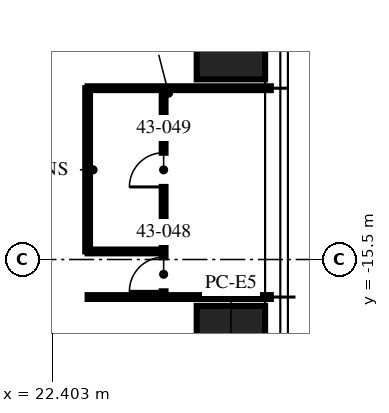
"""IFC4 building model, lengths in metres.
Left out: names, types, materials, properties, quantities, classifications, styles, units other than length and angle.
Written with IfcOpenShell. Run it as: python <this file> out.ifc"""

import sys

from ifc_helpers import new_model, si_unit, direction, frame, frame_2d, origin, origin_2d, place, context, subcontext, project, spatial, rectangle, hollow_rectangle, extrude, element, fill, save


model = new_model("IFC4")
c1 = context("Model", 3, precision=1e-05, world=origin(), true_north=direction((0.0, 1.0)))
c2 = subcontext(c1, "Body", "Model", "MODEL_VIEW")
j1 = project(units=[si_unit("LENGTHUNIT", "METRE"), si_unit("PLANEANGLEUNIT", "RADIAN")], contexts=[c1])
p1 = place(None, origin())
s1 = spatial("IfcSite", under=j1, at=p1, CompositionType="ELEMENT")
p2 = place(p1, origin())
s2 = spatial("IfcBuilding", under=s1, at=p2, CompositionType="ELEMENT")
p3 = place(p2, frame((0.0, 0.0, 171.0)))
s3 = spatial("IfcBuildingStorey", under=s2, at=p3, CompositionType="ELEMENT", Elevation=171.0)
for number, where, z_axis, x_axis in (
    (1, (27.1, -9.16, 0.0), (0.0, 0.0, 1.0), (0.0, 1.0, 0.0)),
    (2, (27.1, -18.32, 0.0), (0.0, 0.0, 1.0), (0.0, 1.0, 0.0)),
):
    element("IfcColumn", number, at=place(p3, frame(where, z_axis=z_axis, x_axis=x_axis)), inside=s3, PredefinedType="COLUMN", context=c2, shape_type="SweptSolid", body=[
        extrude(hollow_rectangle(XDim=3.2, YDim=1.8, WallThickness=0.2, at=origin_2d()), origin(), (0.0, 0.0, 1.0), 3.75),
    ])
for number, where, z_axis, x_axis in (
    (3, (23.33, -16.488, 0.0), (0.0, 0.0, 1.0), (1.0, 0.0, 0.0)),
    (4, (23.33, -10.992, 0.0), (0.0, 0.0, 1.0), (1.0, 0.0, 0.0)),
):
    element("IfcWall", number, at=place(p3, frame(where, z_axis=z_axis, x_axis=x_axis)), inside=s3, PredefinedType="PARTITIONING", context=c2, shape_type="SweptSolid", body=[
        extrude(rectangle(XDim=4.82, YDim=0.1, at=frame_2d((2.41, 0.0))), origin(), (0.0, 0.0, 1.0), 2.81),
    ])
p4 = place(p3, frame((25.33, -16.488, 0.0), z_axis=(0.0, 0.0, 1.0), x_axis=(0.0, 1.0, 0.0)))
e5 = element("IfcWall", 5, at=p4, inside=s3, PredefinedType="PARTITIONING", context=c2, shape_type="SweptSolid", body=[
    extrude(rectangle(XDim=5.496, YDim=0.1, at=frame_2d((2.748, 0.0))), origin(), (0.0, 0.0, 1.0), 2.81),
])
p5 = place(p4, frame((0.15, 0.0, 0.0)))
e6 = element("IfcOpeningElement", 6, at=p5, cuts=e5, PredefinedType="OPENING", context=c2, shape_type="SweptSolid", body=[
    extrude(rectangle(XDim=0.9, YDim=2.1, at=frame_2d((0.45, 1.05))), frame((0.0, 0.06, 0.0), z_axis=(0.0, -1.0, 0.0), x_axis=(1.0, 0.0, 0.0)), (0.0, 0.0, 1.0), 0.12),
])
p6 = place(p4, frame((2.898, 0.0, 0.0)))
e7 = element("IfcOpeningElement", 7, at=p6, cuts=e5, PredefinedType="OPENING", context=c2, shape_type="SweptSolid", body=[
    extrude(rectangle(XDim=0.9, YDim=2.1, at=frame_2d((0.45, 1.05))), frame((0.0, 0.06, 0.0), z_axis=(0.0, -1.0, 0.0), x_axis=(1.0, 0.0, 0.0)), (0.0, 0.0, 1.0), 0.12),
])
p7 = place(p3, frame((23.33, -15.288, 0.0), z_axis=(0.0, 0.0, 1.0), x_axis=(1.0, 0.0, 0.0)))
e8 = element("IfcWall", 8, at=p7, inside=s3, PredefinedType="PARTITIONING", context=c2, shape_type="SweptSolid", body=[
    extrude(rectangle(XDim=2.0, YDim=0.1, at=frame_2d((1.0, 0.0))), origin(), (0.0, 0.0, 1.0), 3.5),
])
p8 = place(p3, frame((23.33, -15.288, 0.0), z_axis=(0.0, 0.0, 1.0), x_axis=(0.0, 1.0, 0.0)))
e9 = element("IfcWall", 9, at=p8, inside=s3, PredefinedType="PARTITIONING", context=c2, shape_type="SweptSolid", body=[
    extrude(rectangle(XDim=4.296, YDim=0.125, at=frame_2d((2.148, 0.0))), origin(), (0.0, 0.0, 1.0), 2.81),
])
p9 = place(p5, origin())
e10 = element("IfcDoor", 10, at=p9, inside=s3, OperationType="SINGLE_SWING_LEFT", PredefinedType="DOOR", context=c2, shape_type="SweptSolid", body=[
    extrude(rectangle(XDim=0.9, YDim=2.1, at=frame_2d((0.45, 1.05))), frame((0.0, 0.025, 0.0), z_axis=(0.0, -1.0, 0.0), x_axis=(1.0, 0.0, 0.0)), (0.0, 0.0, 1.0), 0.05),
])
fill(e6, e10)
p10 = place(p6, origin())
e11 = element("IfcDoor", 11, at=p10, inside=s3, OperationType="SINGLE_SWING_LEFT", PredefinedType="DOOR", context=c2, shape_type="SweptSolid", body=[
    extrude(rectangle(XDim=0.9, YDim=2.1, at=frame_2d((0.45, 1.05))), frame((0.0, 0.025, 0.0), z_axis=(0.0, -1.0, 0.0), x_axis=(1.0, 0.0, 0.0)), (0.0, 0.0, 1.0), 0.05),
])
fill(e7, e11)
save(model, sys.argv[1])
